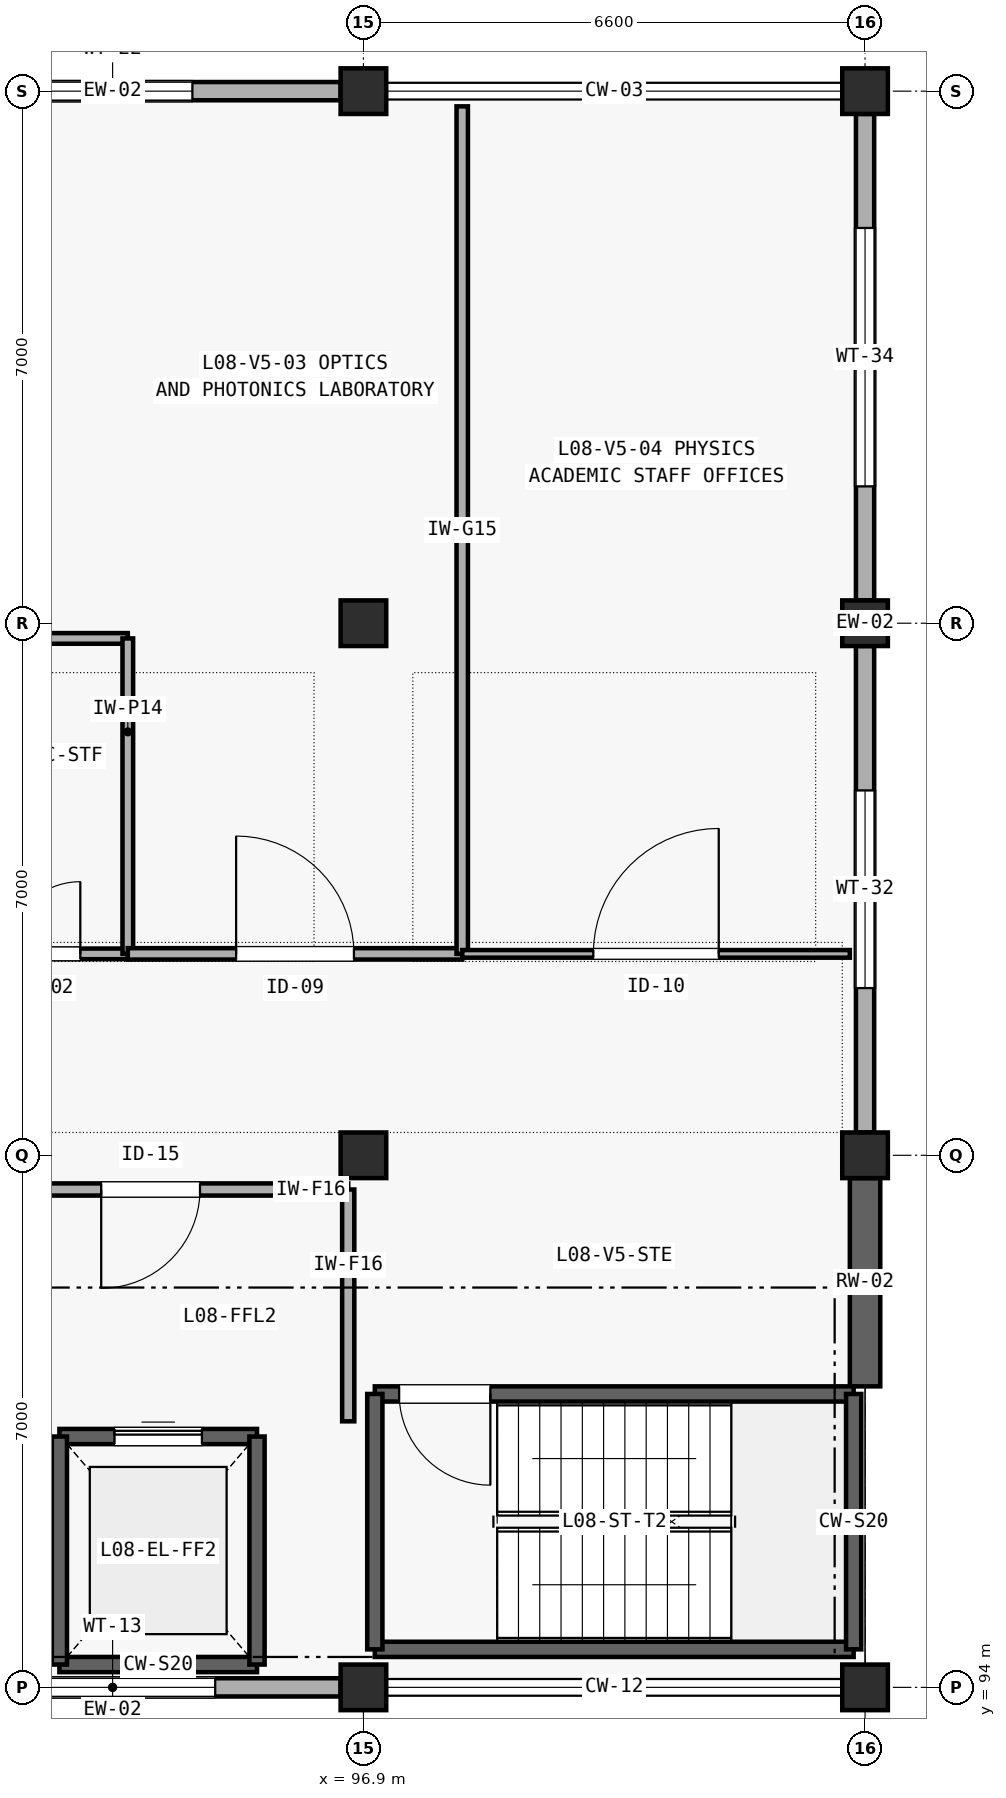
"""IFC4 building model, lengths in metres.
Left out: names, types, materials, properties, quantities, classifications, styles, units other than length and angle.
Written with IfcOpenShell. Run it as: python <this file> out.ifc"""

import sys

from ifc_helpers import new_model, si_unit, direction, frame, frame_2d, origin, origin_2d, place, context, subcontext, project, spatial, rectangle, extrude, element, fill, save


model = new_model("IFC4")
c1 = context("Model", 3, precision=1e-05, world=origin(), true_north=direction((0.0, 1.0)))
c2 = subcontext(c1, "Body", "Model", "MODEL_VIEW")
j1 = project(units=[si_unit("LENGTHUNIT", "METRE"), si_unit("PLANEANGLEUNIT", "RADIAN")], contexts=[c1])
p1 = place(None, origin())
s1 = spatial("IfcSite", under=j1, at=p1, CompositionType="ELEMENT")
p2 = place(p1, origin())
s2 = spatial("IfcBuilding", under=s1, at=p2, CompositionType="ELEMENT")
p3 = place(p2, frame((0.0, 0.0, 33.6)))
s3 = spatial("IfcBuildingStorey", under=s2, at=p3, CompositionType="ELEMENT", Elevation=33.6)
for number, where, z_axis, x_axis in (
    (1, (96.9, 94.0, 0.0), (0.0, 0.0, 1.0), (1.0, 0.0, 0.0)),
    (2, (96.9, 101.0, 0.0), (0.0, 0.0, 1.0), (1.0, 0.0, 0.0)),
    (3, (96.9, 108.0, 0.0), (0.0, 0.0, 1.0), (1.0, 0.0, 0.0)),
    (4, (96.9, 115.0, 0.0), (0.0, 0.0, 1.0), (1.0, 0.0, 0.0)),
    (5, (103.5, 94.0, 0.0), (0.0, 0.0, 1.0), (1.0, 0.0, 0.0)),
    (6, (103.5, 101.0, 0.0), (0.0, 0.0, 1.0), (1.0, 0.0, 0.0)),
    (7, (103.5, 108.0, 0.0), (0.0, 0.0, 1.0), (1.0, 0.0, 0.0)),
    (8, (103.5, 115.0, 0.0), (0.0, 0.0, 1.0), (1.0, 0.0, 0.0)),
):
    element("IfcColumn", number, at=place(p3, frame(where, z_axis=z_axis, x_axis=x_axis)), inside=s3, PredefinedType="COLUMN", context=c2, shape_type="SweptSolid", body=[
        extrude(rectangle(XDim=0.6, YDim=0.6, at=origin_2d()), origin(), (0.0, 0.0, 1.0), 4.2),
    ])
p4 = place(p3, frame((90.6, 94.0, 0.0), z_axis=(0.0, 0.0, 1.0), x_axis=(1.0, 0.0, 0.0)))
e9 = element("IfcWall", 9, at=p4, inside=s3, PredefinedType="SOLIDWALL", context=c2, shape_type="SweptSolid", body=[
    extrude(rectangle(XDim=6.0, YDim=0.24, at=frame_2d((3.0, 0.0))), origin(), (0.0, 0.0, 1.0), 3.365),
])
p5 = place(p4, frame((1.65, 0.0, 0.85)))
e10 = element("IfcOpeningElement", 10, at=p5, cuts=e9, PredefinedType="OPENING", context=c2, shape_type="SweptSolid", body=[
    extrude(rectangle(XDim=2.7, YDim=1.5, at=frame_2d((1.35, 0.75))), frame((0.0, 0.13, 0.0), z_axis=(0.0, -1.0, 0.0), x_axis=(1.0, 0.0, 0.0)), (0.0, 0.0, 1.0), 0.26),
])
p6 = place(p3, frame((90.6, 115.0, 0.0), z_axis=(0.0, 0.0, 1.0), x_axis=(1.0, 0.0, 0.0)))
e11 = element("IfcWall", 11, at=p6, inside=s3, PredefinedType="SOLIDWALL", context=c2, shape_type="SweptSolid", body=[
    extrude(rectangle(XDim=6.0, YDim=0.24, at=frame_2d((3.0, 0.0))), origin(), (0.0, 0.0, 1.0), 3.365),
])
p7 = place(p6, frame((1.95, 0.0, 0.85)))
e12 = element("IfcOpeningElement", 12, at=p7, cuts=e11, PredefinedType="OPENING", context=c2, shape_type="SweptSolid", body=[
    extrude(rectangle(XDim=2.1, YDim=1.6, at=frame_2d((1.05, 0.8))), frame((0.0, 0.13, 0.0), z_axis=(0.0, -1.0, 0.0), x_axis=(1.0, 0.0, 0.0)), (0.0, 0.0, 1.0), 0.26),
])
p8 = place(p3, frame((103.5, 97.96, 0.0), z_axis=(0.0, 0.0, 1.0), x_axis=(0.0, 1.0, 0.0)))
e13 = element("IfcWall", 13, at=p8, inside=s3, PredefinedType="SHEAR", context=c2, shape_type="SweptSolid", body=[
    extrude(rectangle(XDim=2.74, YDim=0.4, at=frame_2d((1.37, 0.0))), origin(), (0.0, 0.0, 1.0), 3.85),
])
p9 = place(p3, frame((103.5, 101.3, 0.0), z_axis=(0.0, 0.0, 1.0), x_axis=(0.0, 1.0, 0.0)))
e14 = element("IfcWall", 14, at=p9, inside=s3, PredefinedType="SOLIDWALL", context=c2, shape_type="SweptSolid", body=[
    extrude(rectangle(XDim=6.4, YDim=0.24, at=frame_2d((3.2, 0.0))), origin(), (0.0, 0.0, 1.0), 3.465),
])
p10 = place(p9, frame((1.9, 0.0, 0.85)))
e15 = element("IfcOpeningElement", 15, at=p10, cuts=e14, PredefinedType="OPENING", context=c2, shape_type="SweptSolid", body=[
    extrude(rectangle(XDim=2.6, YDim=1.2, at=frame_2d((1.3, 0.6))), frame((0.0, 0.13, 0.0), z_axis=(0.0, -1.0, 0.0), x_axis=(1.0, 0.0, 0.0)), (0.0, 0.0, 1.0), 0.26),
])
p11 = place(p3, frame((103.5, 108.3, 0.0), z_axis=(0.0, 0.0, 1.0), x_axis=(0.0, 1.0, 0.0)))
e16 = element("IfcWall", 16, at=p11, inside=s3, PredefinedType="SOLIDWALL", context=c2, shape_type="SweptSolid", body=[
    extrude(rectangle(XDim=6.4, YDim=0.24, at=frame_2d((3.2, 0.0))), origin(), (0.0, 0.0, 1.0), 3.465),
])
p12 = place(p11, frame((1.5, 0.0, 0.85)))
e17 = element("IfcOpeningElement", 17, at=p12, cuts=e16, PredefinedType="OPENING", context=c2, shape_type="SweptSolid", body=[
    extrude(rectangle(XDim=3.4, YDim=1.2, at=frame_2d((1.7, 0.6))), frame((0.0, 0.13, 0.0), z_axis=(0.0, -1.0, 0.0), x_axis=(1.0, 0.0, 0.0)), (0.0, 0.0, 1.0), 0.26),
])
p13 = place(p3, frame((97.05, 94.5, 0.0), z_axis=(0.0, 0.0, 1.0), x_axis=(1.0, 0.0, 0.0)))
e18 = element("IfcWall", 18, at=p13, inside=s3, PredefinedType="SHEAR", context=c2, shape_type="SweptSolid", body=[
    extrude(rectangle(XDim=6.3, YDim=0.2, at=frame_2d((3.15, 0.0))), origin(), (0.0, 0.0, 1.0), 4.2),
])
p14 = place(p3, frame((97.05, 97.86, 0.0), z_axis=(0.0, 0.0, 1.0), x_axis=(1.0, 0.0, 0.0)))
e19 = element("IfcWall", 19, at=p14, inside=s3, PredefinedType="SHEAR", context=c2, shape_type="SweptSolid", body=[
    extrude(rectangle(XDim=6.3, YDim=0.2, at=frame_2d((3.15, 0.0))), origin(), (0.0, 0.0, 1.0), 4.2),
])
p15 = place(p14, frame((0.32, 0.0, 0.0)))
e20 = element("IfcOpeningElement", 20, at=p15, cuts=e19, PredefinedType="OPENING", context=c2, shape_type="SweptSolid", body=[
    extrude(rectangle(XDim=1.2, YDim=2.15, at=frame_2d((0.6, 1.075))), frame((0.0, 0.11, 0.0), z_axis=(0.0, -1.0, 0.0), x_axis=(1.0, 0.0, 0.0)), (0.0, 0.0, 1.0), 0.22),
])
for number, where, z_axis, x_axis in (
    (21, (97.05, 94.5, 0.0), (0.0, 0.0, 1.0), (0.0, 1.0, 0.0)),
    (22, (103.35, 94.5, 0.0), (0.0, 0.0, 1.0), (0.0, 1.0, 0.0)),
):
    element("IfcWall", number, at=place(p3, frame(where, z_axis=z_axis, x_axis=x_axis)), inside=s3, PredefinedType="SHEAR", context=c2, shape_type="SweptSolid", body=[
        extrude(rectangle(XDim=3.36, YDim=0.2, at=frame_2d((1.68, 0.0))), origin(), (0.0, 0.0, 1.0), 4.2),
    ])
p16 = place(p3, frame((92.9, 94.3, 0.0), z_axis=(0.0, 0.0, 1.0), x_axis=(1.0, 0.0, 0.0)))
e23 = element("IfcWall", 23, at=p16, inside=s3, PredefinedType="SHEAR", context=c2, shape_type="SweptSolid", body=[
    extrude(rectangle(XDim=2.6, YDim=0.2, at=frame_2d((1.3, 0.0))), origin(), (0.0, 0.0, 1.0), 4.2),
])
p17 = place(p3, frame((92.9, 97.3, 0.0), z_axis=(0.0, 0.0, 1.0), x_axis=(1.0, 0.0, 0.0)))
e24 = element("IfcWall", 24, at=p17, inside=s3, PredefinedType="SHEAR", context=c2, shape_type="SweptSolid", body=[
    extrude(rectangle(XDim=2.6, YDim=0.2, at=frame_2d((1.3, 0.0))), origin(), (0.0, 0.0, 1.0), 4.2),
])
p18 = place(p17, frame((0.725, 0.0, 0.0)))
e25 = element("IfcOpeningElement", 25, at=p18, cuts=e24, PredefinedType="OPENING", context=c2, shape_type="SweptSolid", body=[
    extrude(rectangle(XDim=1.15, YDim=2.2, at=frame_2d((0.575, 1.1))), frame((0.0, 0.11, 0.0), z_axis=(0.0, -1.0, 0.0), x_axis=(1.0, 0.0, 0.0)), (0.0, 0.0, 1.0), 0.22),
])
for number, where, z_axis, x_axis in (
    (26, (92.9, 94.3, 0.0), (0.0, 0.0, 1.0), (0.0, 1.0, 0.0)),
    (27, (95.5, 94.3, 0.0), (0.0, 0.0, 1.0), (0.0, 1.0, 0.0)),
):
    element("IfcWall", number, at=place(p3, frame(where, z_axis=z_axis, x_axis=x_axis)), inside=s3, PredefinedType="SHEAR", context=c2, shape_type="SweptSolid", body=[
        extrude(rectangle(XDim=3.0, YDim=0.2, at=frame_2d((1.5, 0.0))), origin(), (0.0, 0.0, 1.0), 4.2),
    ])
p19 = place(p3, frame((91.5, 100.55, 0.0), z_axis=(0.0, 0.0, 1.0), x_axis=(1.0, 0.0, 0.0)))
e28 = element("IfcWall", 28, at=p19, inside=s3, PredefinedType="SOLIDWALL", context=c2, shape_type="SweptSolid", body=[
    extrude(rectangle(XDim=5.2, YDim=0.16, at=frame_2d((2.6, 0.0))), origin(), (0.0, 0.0, 1.0), 3.9),
])
p20 = place(p19, frame((1.95, 0.0, 0.0)))
e29 = element("IfcOpeningElement", 29, at=p20, cuts=e28, PredefinedType="OPENING", context=c2, shape_type="SweptSolid", body=[
    extrude(rectangle(XDim=1.3, YDim=2.15, at=frame_2d((0.65, 1.075))), frame((0.0, 0.09, 0.0), z_axis=(0.0, -1.0, 0.0), x_axis=(1.0, 0.0, 0.0)), (0.0, 0.0, 1.0), 0.18),
])
p21 = place(p3, frame((96.7, 97.5, 0.0), z_axis=(0.0, 0.0, 1.0), x_axis=(0.0, 1.0, 0.0)))
e30 = element("IfcWall", 30, at=p21, inside=s3, PredefinedType="SOLIDWALL", context=c2, shape_type="SweptSolid", body=[
    extrude(rectangle(XDim=3.05, YDim=0.16, at=frame_2d((1.525, 0.0))), origin(), (0.0, 0.0, 1.0), 3.405),
])
p22 = place(p3, frame((91.6, 103.65, 0.0), z_axis=(0.0, 0.0, 1.0), x_axis=(1.0, 0.0, 0.0)))
e31 = element("IfcWall", 31, at=p22, inside=s3, PredefinedType="PLUMBINGWALL", context=c2, shape_type="SweptSolid", body=[
    extrude(rectangle(XDim=2.2, YDim=0.14, at=frame_2d((1.1, 0.0))), origin(), (0.0, 0.0, 1.0), 3.9),
])
p23 = place(p22, frame((0.625, 0.0, 0.0)))
e32 = element("IfcOpeningElement", 32, at=p23, cuts=e31, PredefinedType="OPENING", context=c2, shape_type="SweptSolid", body=[
    extrude(rectangle(XDim=0.95, YDim=2.1, at=frame_2d((0.475, 1.05))), frame((0.0, 0.08, 0.0), z_axis=(0.0, -1.0, 0.0), x_axis=(1.0, 0.0, 0.0)), (0.0, 0.0, 1.0), 0.16),
])
p24 = place(p3, frame((91.6, 107.8, 0.0), z_axis=(0.0, 0.0, 1.0), x_axis=(1.0, 0.0, 0.0)))
e33 = element("IfcWall", 33, at=p24, inside=s3, PredefinedType="PLUMBINGWALL", context=c2, shape_type="SweptSolid", body=[
    extrude(rectangle(XDim=2.2, YDim=0.14, at=frame_2d((1.1, 0.0))), origin(), (0.0, 0.0, 1.0), 3.365),
])
p25 = place(p3, frame((93.8, 103.65, 0.0), z_axis=(0.0, 0.0, 1.0), x_axis=(0.0, 1.0, 0.0)))
e34 = element("IfcWall", 34, at=p25, inside=s3, PredefinedType="PLUMBINGWALL", context=c2, shape_type="SweptSolid", body=[
    extrude(rectangle(XDim=4.15, YDim=0.14, at=frame_2d((2.075, 0.0))), origin(), (0.0, 0.0, 1.0), 3.9),
])
p26 = place(p3, frame((93.8, 103.65, 0.0), z_axis=(0.0, 0.0, 1.0), x_axis=(1.0, 0.0, 0.0)))
e35 = element("IfcWall", 35, at=p26, inside=s3, PredefinedType="PARTITIONING", context=c2, shape_type="SweptSolid", body=[
    extrude(rectangle(XDim=4.4, YDim=0.15, at=frame_2d((2.2, 0.0))), origin(), (0.0, 0.0, 1.0), 3.9),
])
p27 = place(p26, frame((1.425, 0.0, 0.0)))
e36 = element("IfcOpeningElement", 36, at=p27, cuts=e35, PredefinedType="OPENING", context=c2, shape_type="SweptSolid", body=[
    extrude(rectangle(XDim=1.55, YDim=2.2, at=frame_2d((0.775, 1.1))), frame((0.0, 0.085, 0.0), z_axis=(0.0, -1.0, 0.0), x_axis=(1.0, 0.0, 0.0)), (0.0, 0.0, 1.0), 0.17),
])
p28 = place(p3, frame((98.2, 103.65, 0.0), z_axis=(0.0, 0.0, 1.0), x_axis=(0.0, 1.0, 0.0)))
e37 = element("IfcWall", 37, at=p28, inside=s3, PredefinedType="PARTITIONING", context=c2, shape_type="SweptSolid", body=[
    extrude(rectangle(XDim=11.15, YDim=0.15, at=frame_2d((5.575, 0.0))), origin(), (0.0, 0.0, 1.0), 3.9),
])
p29 = place(p3, frame((98.2, 103.65, 0.0), z_axis=(0.0, 0.0, 1.0), x_axis=(1.0, 0.0, 0.0)))
e38 = element("IfcWall", 38, at=p29, inside=s3, PredefinedType="PARTITIONING", context=c2, shape_type="SweptSolid", body=[
    extrude(rectangle(XDim=5.1, YDim=0.1, at=frame_2d((2.55, 0.0))), origin(), (0.0, 0.0, 1.0), 3.9),
])
p30 = place(p29, frame((1.725, 0.0, 0.0)))
e39 = element("IfcOpeningElement", 39, at=p30, cuts=e38, PredefinedType="OPENING", context=c2, shape_type="SweptSolid", body=[
    extrude(rectangle(XDim=1.65, YDim=2.25, at=frame_2d((0.825, 1.125))), frame((0.0, 0.06, 0.0), z_axis=(0.0, -1.0, 0.0), x_axis=(1.0, 0.0, 0.0)), (0.0, 0.0, 1.0), 0.12),
])
p31 = place(p5, origin())
e40 = element("IfcWindow", 40, at=p31, inside=s3, PartitioningType="SINGLE_PANEL", PredefinedType="WINDOW", context=c2, shape_type="SweptSolid", body=[
    extrude(rectangle(XDim=2.7, YDim=1.5, at=frame_2d((1.35, 0.75))), frame((0.0, 0.03, 0.0), z_axis=(0.0, -1.0, 0.0), x_axis=(1.0, 0.0, 0.0)), (0.0, 0.0, 1.0), 0.06),
])
fill(e10, e40)
p32 = place(p7, origin())
e41 = element("IfcWindow", 41, at=p32, inside=s3, PartitioningType="SINGLE_PANEL", PredefinedType="WINDOW", context=c2, shape_type="SweptSolid", body=[
    extrude(rectangle(XDim=2.1, YDim=1.6, at=frame_2d((1.05, 0.8))), frame((0.0, 0.03, 0.0), z_axis=(0.0, -1.0, 0.0), x_axis=(1.0, 0.0, 0.0)), (0.0, 0.0, 1.0), 0.06),
])
fill(e12, e41)
p33 = place(p10, origin())
e42 = element("IfcWindow", 42, at=p33, inside=s3, PartitioningType="SINGLE_PANEL", PredefinedType="WINDOW", context=c2, shape_type="SweptSolid", body=[
    extrude(rectangle(XDim=2.6, YDim=1.2, at=frame_2d((1.3, 0.6))), frame((0.0, 0.03, 0.0), z_axis=(0.0, -1.0, 0.0), x_axis=(1.0, 0.0, 0.0)), (0.0, 0.0, 1.0), 0.06),
])
fill(e15, e42)
p34 = place(p12, origin())
e43 = element("IfcWindow", 43, at=p34, inside=s3, PartitioningType="SINGLE_PANEL", PredefinedType="WINDOW", context=c2, shape_type="SweptSolid", body=[
    extrude(rectangle(XDim=3.4, YDim=1.2, at=frame_2d((1.7, 0.6))), frame((0.0, 0.03, 0.0), z_axis=(0.0, -1.0, 0.0), x_axis=(1.0, 0.0, 0.0)), (0.0, 0.0, 1.0), 0.06),
])
fill(e17, e43)
p35 = place(p15, frame((1.2, 0.0, 0.0), z_axis=(0.0, 0.0, 1.0), x_axis=(-1.0, 0.0, 0.0)))
e44 = element("IfcDoor", 44, at=p35, inside=s3, OperationType="SINGLE_SWING_LEFT", PredefinedType="DOOR", context=c2, shape_type="SweptSolid", body=[
    extrude(rectangle(XDim=1.2, YDim=2.15, at=frame_2d((0.6, 1.075))), frame((0.0, 0.025, 0.0), z_axis=(0.0, -1.0, 0.0), x_axis=(1.0, 0.0, 0.0)), (0.0, 0.0, 1.0), 0.05),
])
fill(e20, e44)
p36 = place(p18, origin())
e45 = element("IfcDoor", 45, at=p36, inside=s3, OperationType="SLIDING_TO_LEFT", PredefinedType="DOOR", context=c2, shape_type="SweptSolid", body=[
    extrude(rectangle(XDim=1.15, YDim=2.2, at=frame_2d((0.575, 1.1))), frame((0.0, 0.025, 0.0), z_axis=(0.0, -1.0, 0.0), x_axis=(1.0, 0.0, 0.0)), (0.0, 0.0, 1.0), 0.05),
])
fill(e25, e45)
p37 = place(p20, frame((1.3, 0.0, 0.0), z_axis=(0.0, 0.0, 1.0), x_axis=(-1.0, 0.0, 0.0)))
e46 = element("IfcDoor", 46, at=p37, inside=s3, OperationType="SINGLE_SWING_RIGHT", PredefinedType="DOOR", context=c2, shape_type="SweptSolid", body=[
    extrude(rectangle(XDim=1.3, YDim=2.15, at=frame_2d((0.65, 1.075))), frame((0.0, 0.025, 0.0), z_axis=(0.0, -1.0, 0.0), x_axis=(1.0, 0.0, 0.0)), (0.0, 0.0, 1.0), 0.05),
])
fill(e29, e46)
p38 = place(p23, origin())
e47 = element("IfcDoor", 47, at=p38, inside=s3, OperationType="SINGLE_SWING_RIGHT", PredefinedType="DOOR", context=c2, shape_type="SweptSolid", body=[
    extrude(rectangle(XDim=0.95, YDim=2.1, at=frame_2d((0.475, 1.05))), frame((0.0, 0.025, 0.0), z_axis=(0.0, -1.0, 0.0), x_axis=(1.0, 0.0, 0.0)), (0.0, 0.0, 1.0), 0.05),
])
fill(e32, e47)
p39 = place(p27, origin())
e48 = element("IfcDoor", 48, at=p39, inside=s3, OperationType="SINGLE_SWING_LEFT", PredefinedType="DOOR", context=c2, shape_type="SweptSolid", body=[
    extrude(rectangle(XDim=1.55, YDim=2.2, at=frame_2d((0.775, 1.1))), frame((0.0, 0.025, 0.0), z_axis=(0.0, -1.0, 0.0), x_axis=(1.0, 0.0, 0.0)), (0.0, 0.0, 1.0), 0.05),
])
fill(e36, e48)
p40 = place(p30, origin())
e49 = element("IfcDoor", 49, at=p40, inside=s3, OperationType="SINGLE_SWING_RIGHT", PredefinedType="DOOR", context=c2, shape_type="SweptSolid", body=[
    extrude(rectangle(XDim=1.65, YDim=2.25, at=frame_2d((0.825, 1.125))), frame((0.0, 0.025, 0.0), z_axis=(0.0, -1.0, 0.0), x_axis=(1.0, 0.0, 0.0)), (0.0, 0.0, 1.0), 0.05),
])
fill(e39, e49)
save(model, sys.argv[1])
